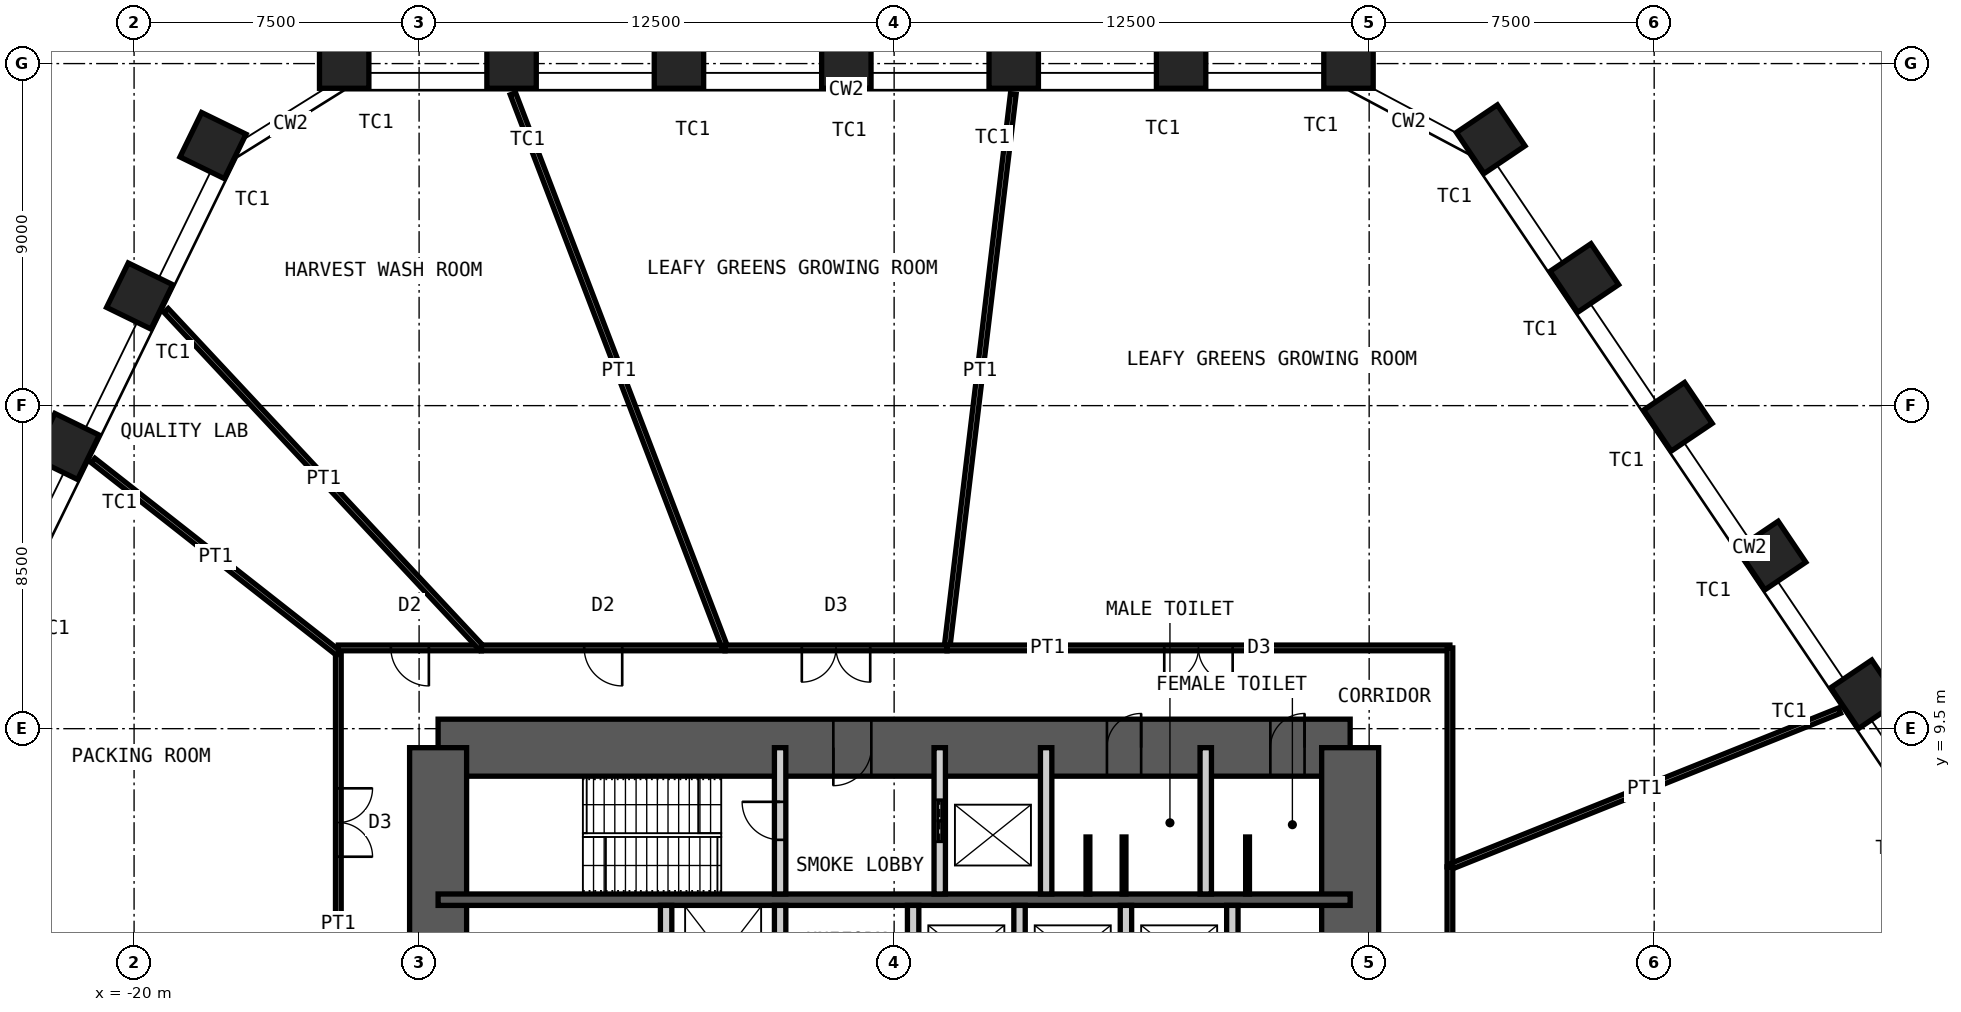
"""IFC4 building model, lengths in metres.
Left out: names, types, materials, properties, quantities, classifications, styles, units other than length and angle.
Written with IfcOpenShell. Run it as: python <this file> out.ifc"""

import sys

from ifc_helpers import new_model, si_unit, direction, frame, frame_2d, origin, origin_2d, place, context, subcontext, project, spatial, rectangle, hollow_rectangle, extrude, element, fill, save


model = new_model("IFC4")
c1 = context("Model", 3, precision=1e-05, world=origin(), true_north=direction((0.0, 1.0)))
c2 = subcontext(c1, "Body", "Model", "MODEL_VIEW")
j1 = project(units=[si_unit("LENGTHUNIT", "METRE"), si_unit("PLANEANGLEUNIT", "RADIAN")], contexts=[c1])
p1 = place(None, origin())
s1 = spatial("IfcSite", under=j1, at=p1, CompositionType="ELEMENT")
p2 = place(p1, origin())
s2 = spatial("IfcBuilding", under=s1, at=p2, CompositionType="ELEMENT")
p3 = place(p2, frame((0.0, 0.0, 42.0)))
s3 = spatial("IfcBuildingStorey", under=s2, at=p3, CompositionType="ELEMENT", Elevation=42.0)
for number, where, z_axis, x_axis in (
    (1, (-14.471, 27.0, 0.0), (0.0, 0.0, 1.0), (-1.0, 0.0, 0.0)),
    (2, (-10.067, 27.0, 0.0), (0.0, 0.0, 1.0), (-1.0, 0.0, 0.0)),
    (3, (-5.662, 27.0, 0.0), (0.0, 0.0, 1.0), (-1.0, 0.0, 0.0)),
    (4, (-1.258, 27.0, 0.0), (0.0, 0.0, 1.0), (-1.0, 0.0, 0.0)),
    (5, (3.147, 27.0, 0.0), (0.0, 0.0, 1.0), (-1.0, 0.0, 0.0)),
    (6, (7.552, 27.0, 0.0), (0.0, 0.0, 1.0), (-1.0, 0.0, 0.0)),
    (7, (11.956, 27.0, 0.0), (0.0, 0.0, 1.0), (-1.0, 0.0, 0.0)),
    (8, (15.698, 25.01, 0.0), (0.0, 0.0, 1.0), (-0.559, 0.829, 0.0)),
    (9, (18.161, 21.359, 0.0), (0.0, 0.0, 1.0), (-0.559, 0.829, 0.0)),
    (10, (20.624, 17.707, 0.0), (0.0, 0.0, 1.0), (-0.559, 0.829, 0.0)),
    (11, (23.087, 14.056, 0.0), (0.0, 0.0, 1.0), (-0.559, 0.829, 0.0)),
    (12, (25.55, 10.404, 0.0), (0.0, 0.0, 1.0), (-0.559, 0.829, 0.0)),
    (13, (-21.785, 16.925, 0.0), (0.0, 0.0, 1.0), (-0.438, -0.899, 0.0)),
    (14, (-19.854, 20.884, 0.0), (0.0, 0.0, 1.0), (-0.438, -0.899, 0.0)),
    (15, (-17.924, 24.843, 0.0), (0.0, 0.0, 1.0), (-0.438, -0.899, 0.0)),
):
    element("IfcColumn", number, at=place(p3, frame(where, z_axis=z_axis, x_axis=x_axis)), inside=s3, PredefinedType="COLUMN", context=c2, shape_type="SweptSolid", body=[
        extrude(hollow_rectangle(XDim=1.3, YDim=1.3, WallThickness=0.1, at=origin_2d()), origin(), (0.0, 0.0, 1.0), 5.0),
    ])
p4 = place(p3, frame((-12.0, 9.0, 0.0), z_axis=(0.0, 0.0, 1.0), x_axis=(1.0, 0.0, 0.0)))
e16 = element("IfcWall", 16, at=p4, inside=s3, PredefinedType="SHEAR", context=c2, shape_type="SweptSolid", body=[
    extrude(rectangle(XDim=24.0, YDim=1.5, at=frame_2d((12.0, 0.0))), origin(), (0.0, 0.0, 1.0), 5.0),
])
p5 = place(p4, frame((10.4, 0.0, 0.0)))
e17 = element("IfcOpeningElement", 17, at=p5, cuts=e16, PredefinedType="OPENING", context=c2, shape_type="SweptSolid", body=[
    extrude(rectangle(XDim=1.0, YDim=2.1, at=frame_2d((0.5, 1.05))), frame((0.0, 0.76, 0.0), z_axis=(0.0, -1.0, 0.0), x_axis=(1.0, 0.0, 0.0)), (0.0, 0.0, 1.0), 1.52),
])
p6 = place(p4, frame((17.6, 0.0, 0.0)))
e18 = element("IfcOpeningElement", 18, at=p6, cuts=e16, PredefinedType="OPENING", context=c2, shape_type="SweptSolid", body=[
    extrude(rectangle(XDim=0.9, YDim=2.1, at=frame_2d((0.45, 1.05))), frame((0.0, 0.76, 0.0), z_axis=(0.0, -1.0, 0.0), x_axis=(1.0, 0.0, 0.0)), (0.0, 0.0, 1.0), 1.52),
])
p7 = place(p4, frame((21.9, 0.0, 0.0)))
e19 = element("IfcOpeningElement", 19, at=p7, cuts=e16, PredefinedType="OPENING", context=c2, shape_type="SweptSolid", body=[
    extrude(rectangle(XDim=0.9, YDim=2.1, at=frame_2d((0.45, 1.05))), frame((0.0, 0.76, 0.0), z_axis=(0.0, -1.0, 0.0), x_axis=(1.0, 0.0, 0.0)), (0.0, 0.0, 1.0), 1.52),
])
p8 = place(p3, frame((12.0, -9.0, 0.0), z_axis=(0.0, 0.0, 1.0), x_axis=(0.0, 1.0, 0.0)))
e20 = element("IfcWall", 20, at=p8, inside=s3, PredefinedType="SHEAR", context=c2, shape_type="SweptSolid", body=[
    extrude(rectangle(XDim=18.0, YDim=1.5, at=frame_2d((9.0, 0.0))), origin(), (0.0, 0.0, 1.0), 5.0),
])
p9 = place(p8, frame((8.1, 0.0, 0.0)))
e21 = element("IfcOpeningElement", 21, at=p9, cuts=e20, PredefinedType="OPENING", context=c2, shape_type="SweptSolid", body=[
    extrude(rectangle(XDim=1.8, YDim=2.1, at=frame_2d((0.9, 1.05))), frame((0.0, 0.76, 0.0), z_axis=(0.0, -1.0, 0.0), x_axis=(1.0, 0.0, 0.0)), (0.0, 0.0, 1.0), 1.52),
])
p10 = place(p3, frame((-12.0, -9.0, 0.0), z_axis=(0.0, 0.0, 1.0), x_axis=(0.0, 1.0, 0.0)))
e22 = element("IfcWall", 22, at=p10, inside=s3, PredefinedType="SHEAR", context=c2, shape_type="SweptSolid", body=[
    extrude(rectangle(XDim=18.0, YDim=1.5, at=frame_2d((9.0, 0.0))), origin(), (0.0, 0.0, 1.0), 5.0),
])
p11 = place(p10, frame((8.1, 0.0, 0.0)))
e23 = element("IfcOpeningElement", 23, at=p11, cuts=e22, PredefinedType="OPENING", context=c2, shape_type="SweptSolid", body=[
    extrude(rectangle(XDim=1.8, YDim=2.1, at=frame_2d((0.9, 1.05))), frame((0.0, 0.76, 0.0), z_axis=(0.0, -1.0, 0.0), x_axis=(1.0, 0.0, 0.0)), (0.0, 0.0, 1.0), 1.52),
])
p12 = place(p3, frame((-12.0, 5.0, 0.0), z_axis=(0.0, 0.0, 1.0), x_axis=(1.0, 0.0, 0.0)))
e24 = element("IfcWall", 24, at=p12, inside=s3, PredefinedType="SHEAR", context=c2, shape_type="SweptSolid", body=[
    extrude(rectangle(XDim=24.0, YDim=0.3, at=frame_2d((12.0, 0.0))), origin(), (0.0, 0.0, 1.0), 5.0),
])
p13 = place(p3, frame((-3.0, 5.15, 0.0), z_axis=(0.0, 0.0, 1.0), x_axis=(0.0, 1.0, 0.0)))
e25 = element("IfcWall", 25, at=p13, inside=s3, PredefinedType="PARTITIONING", context=c2, shape_type="SweptSolid", body=[
    extrude(rectangle(XDim=3.85, YDim=0.3, at=frame_2d((1.925, 0.0))), origin(), (0.0, 0.0, 1.0), 4.78),
])
p14 = place(p13, frame((1.425, 0.0, 0.0)))
e26 = element("IfcOpeningElement", 26, at=p14, cuts=e25, PredefinedType="OPENING", context=c2, shape_type="SweptSolid", body=[
    extrude(rectangle(XDim=1.0, YDim=2.1, at=frame_2d((0.5, 1.05))), frame((0.0, 0.16, 0.0), z_axis=(0.0, -1.0, 0.0), x_axis=(1.0, 0.0, 0.0)), (0.0, 0.0, 1.0), 0.32),
])
p15 = place(p3, frame((1.2, 5.15, 0.0), z_axis=(0.0, 0.0, 1.0), x_axis=(0.0, 1.0, 0.0)))
e27 = element("IfcWall", 27, at=p15, inside=s3, PredefinedType="PARTITIONING", context=c2, shape_type="SweptSolid", body=[
    extrude(rectangle(XDim=3.85, YDim=0.3, at=frame_2d((1.925, 0.0))), origin(), (0.0, 0.0, 1.0), 4.78),
])
p16 = place(p15, frame((1.375, 0.0, 0.0)))
e28 = element("IfcOpeningElement", 28, at=p16, cuts=e27, PredefinedType="OPENING", context=c2, shape_type="SweptSolid", body=[
    extrude(rectangle(XDim=1.1, YDim=2.4, at=frame_2d((0.55, 1.2))), frame((0.0, 0.16, 0.0), z_axis=(0.0, -1.0, 0.0), x_axis=(1.0, 0.0, 0.0)), (0.0, 0.0, 1.0), 0.32),
])
for number, where, z_axis, x_axis in (
    (29, (4.0, 5.15, 0.0), (0.0, 0.0, 1.0), (0.0, 1.0, 0.0)),
    (30, (8.2, 5.15, 0.0), (0.0, 0.0, 1.0), (0.0, 1.0, 0.0)),
):
    element("IfcWall", number, at=place(p3, frame(where, z_axis=z_axis, x_axis=x_axis)), inside=s3, PredefinedType="PARTITIONING", context=c2, shape_type="SweptSolid", body=[
        extrude(rectangle(XDim=3.85, YDim=0.3, at=frame_2d((1.925, 0.0))), origin(), (0.0, 0.0, 1.0), 4.78),
    ])
for number, where, z_axis, x_axis in (
    (31, (-6.0, 2.2, 0.0), (0.0, 0.0, 1.0), (0.0, 1.0, 0.0)),
    (32, (-3.0, 2.2, 0.0), (0.0, 0.0, 1.0), (0.0, 1.0, 0.0)),
    (33, (0.5, 2.2, 0.0), (0.0, 0.0, 1.0), (0.0, 1.0, 0.0)),
    (34, (3.3, 2.2, 0.0), (0.0, 0.0, 1.0), (0.0, 1.0, 0.0)),
    (35, (6.1, 2.2, 0.0), (0.0, 0.0, 1.0), (0.0, 1.0, 0.0)),
    (36, (8.9, 2.2, 0.0), (0.0, 0.0, 1.0), (0.0, 1.0, 0.0)),
):
    element("IfcWall", number, at=place(p3, frame(where, z_axis=z_axis, x_axis=x_axis)), inside=s3, PredefinedType="PARTITIONING", context=c2, shape_type="SweptSolid", body=[
        extrude(rectangle(XDim=2.65, YDim=0.3, at=frame_2d((1.325, 0.0))), origin(), (0.0, 0.0, 1.0), 4.78),
    ])
for number, where, z_axis, x_axis in (
    (37, (5.1, 5.15, 0.0), (0.0, 0.0, 1.0), (0.0, 1.0, 0.0)),
    (38, (6.05, 5.15, 0.0), (0.0, 0.0, 1.0), (0.0, 1.0, 0.0)),
    (39, (9.3, 5.15, 0.0), (0.0, 0.0, 1.0), (0.0, 1.0, 0.0)),
):
    element("IfcWall", number, at=place(p3, frame(where, z_axis=z_axis, x_axis=x_axis)), inside=s3, PredefinedType="PARTITIONING", context=c2, shape_type="SweptSolid", body=[
        extrude(rectangle(XDim=1.5, YDim=0.1, at=frame_2d((0.75, 0.0))), origin(), (0.0, 0.0, 1.0), 2.1),
    ])
p17 = place(p3, frame((3.135, 26.201, 0.0), z_axis=(0.0, 0.0, 1.0), x_axis=(-0.118796980211, -0.992918565388, 0.0)))
e40 = element("IfcWall", 40, at=p17, inside=s3, PredefinedType="PARTITIONING", context=c2, shape_type="SweptSolid", body=[
    extrude(rectangle(XDim=14.68, YDim=0.15, at=frame_2d((7.34, 0.0))), origin(), (0.0, 0.0, 1.0), 3.7),
])
p18 = place(p3, frame((1.391, 11.625, 0.0), z_axis=(0.0, 0.0, 1.0), x_axis=(1.0, 0.0, 0.0)))
e41 = element("IfcWall", 41, at=p18, inside=s3, PredefinedType="PARTITIONING", context=c2, shape_type="SweptSolid", body=[
    extrude(rectangle(XDim=13.234, YDim=0.15, at=frame_2d((6.617, 0.0))), origin(), (0.0, 0.0, 1.0), 4.8),
])
p19 = place(p18, frame((5.717, 0.0, 0.0)))
e42 = element("IfcOpeningElement", 42, at=p19, cuts=e41, PredefinedType="OPENING", context=c2, shape_type="SweptSolid", body=[
    extrude(rectangle(XDim=1.8, YDim=2.4, at=frame_2d((0.9, 1.2))), frame((0.0, 0.085, 0.0), z_axis=(0.0, -1.0, 0.0), x_axis=(1.0, 0.0, 0.0)), (0.0, 0.0, 1.0), 0.17),
])
p20 = place(p3, frame((14.625, 11.625, 0.0), z_axis=(0.0, 0.0, 1.0), x_axis=(0.0, -1.0, 0.0)))
e43 = element("IfcWall", 43, at=p20, inside=s3, PredefinedType="PARTITIONING", context=c2, shape_type="SweptSolid", body=[
    extrude(rectangle(XDim=5.761, YDim=0.15, at=frame_2d((2.88, 0.0))), origin(), (0.0, 0.0, 1.0), 4.8),
])
p21 = place(p3, frame((24.877, 9.975, 0.0), z_axis=(0.0, 0.0, 1.0), x_axis=(-0.928157765849, -0.372186998288, 0.0)))
e44 = element("IfcWall", 44, at=p21, inside=s3, PredefinedType="PARTITIONING", context=c2, shape_type="SweptSolid", body=[
    extrude(rectangle(XDim=11.046, YDim=0.15, at=frame_2d((5.523, 0.0))), origin(), (0.0, 0.0, 1.0), 3.7),
])
p22 = place(p3, frame((14.625, 5.864, 0.0), z_axis=(0.0, 0.0, 1.0), x_axis=(0.0, -1.0, 0.0)))
e45 = element("IfcWall", 45, at=p22, inside=s3, PredefinedType="PARTITIONING", context=c2, shape_type="SweptSolid", body=[
    extrude(rectangle(XDim=8.195, YDim=0.15, at=frame_2d((4.097, 0.0))), origin(), (0.0, 0.0, 1.0), 4.8),
])
p23 = place(p22, frame((3.198, 0.0, 0.0)))
e46 = element("IfcOpeningElement", 46, at=p23, cuts=e45, PredefinedType="OPENING", context=c2, shape_type="SweptSolid", body=[
    extrude(rectangle(XDim=1.8, YDim=2.4, at=frame_2d((0.9, 1.2))), frame((0.0, 0.085, 0.0), z_axis=(0.0, -1.0, 0.0), x_axis=(1.0, 0.0, 0.0)), (0.0, 0.0, 1.0), 0.17),
])
p24 = place(p3, frame((-26.85, 4.725, 0.0), z_axis=(0.0, 0.0, 1.0), x_axis=(0.984869569104, -0.173297235559, 0.0)))
e47 = element("IfcWall", 47, at=p24, inside=s3, PredefinedType="PARTITIONING", context=c2, shape_type="SweptSolid", body=[
    extrude(rectangle(XDim=12.413, YDim=0.15, at=frame_2d((6.207, 0.0))), origin(), (0.0, 0.0, 1.0), 3.7),
])
p25 = place(p3, frame((-14.625, 2.573, 0.0), z_axis=(0.0, 0.0, 1.0), x_axis=(0.0, 1.0, 0.0)))
e48 = element("IfcWall", 48, at=p25, inside=s3, PredefinedType="PARTITIONING", context=c2, shape_type="SweptSolid", body=[
    extrude(rectangle(XDim=8.915, YDim=0.15, at=frame_2d((4.457, 0.0))), origin(), (0.0, 0.0, 1.0), 4.8),
])
p26 = place(p25, frame((3.557, 0.0, 0.0)))
e49 = element("IfcOpeningElement", 49, at=p26, cuts=e48, PredefinedType="OPENING", context=c2, shape_type="SweptSolid", body=[
    extrude(rectangle(XDim=1.8, YDim=2.4, at=frame_2d((0.9, 1.2))), frame((0.0, 0.085, 0.0), z_axis=(0.0, -1.0, 0.0), x_axis=(1.0, 0.0, 0.0)), (0.0, 0.0, 1.0), 0.17),
])
p27 = place(p3, frame((-21.077, 16.557, 0.0), z_axis=(0.0, 0.0, 1.0), x_axis=(0.786385446389, -0.617736132752, 0.0)))
e50 = element("IfcWall", 50, at=p27, inside=s3, PredefinedType="PARTITIONING", context=c2, shape_type="SweptSolid", body=[
    extrude(rectangle(XDim=8.205, YDim=0.15, at=frame_2d((4.103, 0.0))), origin(), (0.0, 0.0, 1.0), 3.7),
])
p28 = place(p3, frame((-14.625, 11.625, 0.0), z_axis=(0.0, 0.0, 1.0), x_axis=(1.0, 0.0, 0.0)))
e51 = element("IfcWall", 51, at=p28, inside=s3, PredefinedType="PARTITIONING", context=c2, shape_type="SweptSolid", body=[
    extrude(rectangle(XDim=3.764, YDim=0.15, at=frame_2d((1.882, 0.0))), origin(), (0.0, 0.0, 1.0), 4.8),
])
p29 = place(p28, frame((1.382, 0.0, 0.0)))
e52 = element("IfcOpeningElement", 52, at=p29, cuts=e51, PredefinedType="OPENING", context=c2, shape_type="SweptSolid", body=[
    extrude(rectangle(XDim=1.0, YDim=2.4, at=frame_2d((0.5, 1.2))), frame((0.0, 0.085, 0.0), z_axis=(0.0, -1.0, 0.0), x_axis=(1.0, 0.0, 0.0)), (0.0, 0.0, 1.0), 0.17),
])
p30 = place(p3, frame((-19.157, 20.504, 0.0), z_axis=(0.0, 0.0, 1.0), x_axis=(0.682689688298, -0.73070841619, 0.0)))
e53 = element("IfcWall", 53, at=p30, inside=s3, PredefinedType="PARTITIONING", context=c2, shape_type="SweptSolid", body=[
    extrude(rectangle(XDim=12.151, YDim=0.15, at=frame_2d((6.076, 0.0))), origin(), (0.0, 0.0, 1.0), 3.7),
])
p31 = place(p3, frame((-10.861, 11.625, 0.0), z_axis=(0.0, 0.0, 1.0), x_axis=(1.0, 0.0, 0.0)))
e54 = element("IfcWall", 54, at=p31, inside=s3, PredefinedType="PARTITIONING", context=c2, shape_type="SweptSolid", body=[
    extrude(rectangle(XDim=6.412, YDim=0.15, at=frame_2d((3.206, 0.0))), origin(), (0.0, 0.0, 1.0), 4.8),
])
p32 = place(p31, frame((2.706, 0.0, 0.0)))
e55 = element("IfcOpeningElement", 55, at=p32, cuts=e54, PredefinedType="OPENING", context=c2, shape_type="SweptSolid", body=[
    extrude(rectangle(XDim=1.0, YDim=2.4, at=frame_2d((0.5, 1.2))), frame((0.0, 0.085, 0.0), z_axis=(0.0, -1.0, 0.0), x_axis=(1.0, 0.0, 0.0)), (0.0, 0.0, 1.0), 0.17),
])
p33 = place(p3, frame((-10.031, 26.207, 0.0), z_axis=(0.0, 0.0, 1.0), x_axis=(0.35747288505, -0.933923517454, 0.0)))
e56 = element("IfcWall", 56, at=p33, inside=s3, PredefinedType="PARTITIONING", context=c2, shape_type="SweptSolid", body=[
    extrude(rectangle(XDim=15.613, YDim=0.15, at=frame_2d((7.807, 0.0))), origin(), (0.0, 0.0, 1.0), 3.7),
])
p34 = place(p3, frame((-4.45, 11.625, 0.0), z_axis=(0.0, 0.0, 1.0), x_axis=(1.0, 0.0, 0.0)))
e57 = element("IfcWall", 57, at=p34, inside=s3, PredefinedType="PARTITIONING", context=c2, shape_type="SweptSolid", body=[
    extrude(rectangle(XDim=5.841, YDim=0.15, at=frame_2d((2.92, 0.0))), origin(), (0.0, 0.0, 1.0), 4.8),
])
p35 = place(p34, frame((2.02, 0.0, 0.0)))
e58 = element("IfcOpeningElement", 58, at=p35, cuts=e57, PredefinedType="OPENING", context=c2, shape_type="SweptSolid", body=[
    extrude(rectangle(XDim=1.8, YDim=2.4, at=frame_2d((0.9, 1.2))), frame((0.0, 0.085, 0.0), z_axis=(0.0, -1.0, 0.0), x_axis=(1.0, 0.0, 0.0)), (0.0, 0.0, 1.0), 0.17),
])
p36 = place(p5, origin())
e59 = element("IfcDoor", 59, at=p36, inside=s3, OperationType="SINGLE_SWING_LEFT", PredefinedType="DOOR", context=c2, shape_type="SweptSolid", body=[
    extrude(rectangle(XDim=1.0, YDim=2.1, at=frame_2d((0.5, 1.05))), frame((0.0, 0.025, 0.0), z_axis=(0.0, -1.0, 0.0), x_axis=(1.0, 0.0, 0.0)), (0.0, 0.0, 1.0), 0.05),
])
fill(e17, e59)
p37 = place(p6, origin())
e60 = element("IfcDoor", 60, at=p37, inside=s3, OperationType="SINGLE_SWING_LEFT", PredefinedType="DOOR", context=c2, shape_type="SweptSolid", body=[
    extrude(rectangle(XDim=0.9, YDim=2.1, at=frame_2d((0.45, 1.05))), frame((0.0, 0.025, 0.0), z_axis=(0.0, -1.0, 0.0), x_axis=(1.0, 0.0, 0.0)), (0.0, 0.0, 1.0), 0.05),
])
fill(e18, e60)
p38 = place(p7, origin())
e61 = element("IfcDoor", 61, at=p38, inside=s3, OperationType="SINGLE_SWING_LEFT", PredefinedType="DOOR", context=c2, shape_type="SweptSolid", body=[
    extrude(rectangle(XDim=0.9, YDim=2.1, at=frame_2d((0.45, 1.05))), frame((0.0, 0.025, 0.0), z_axis=(0.0, -1.0, 0.0), x_axis=(1.0, 0.0, 0.0)), (0.0, 0.0, 1.0), 0.05),
])
fill(e19, e61)
p39 = place(p14, origin())
e62 = element("IfcDoor", 62, at=p39, inside=s3, OperationType="SINGLE_SWING_LEFT", PredefinedType="DOOR", context=c2, shape_type="SweptSolid", body=[
    extrude(rectangle(XDim=1.0, YDim=2.1, at=frame_2d((0.5, 1.05))), frame((0.0, 0.025, 0.0), z_axis=(0.0, -1.0, 0.0), x_axis=(1.0, 0.0, 0.0)), (0.0, 0.0, 1.0), 0.05),
])
fill(e26, e62)
p40 = place(p16, origin())
e63 = element("IfcDoor", 63, at=p40, inside=s3, OperationType="DOUBLE_DOOR_SLIDING", PredefinedType="DOOR", context=c2, shape_type="SweptSolid", body=[
    extrude(rectangle(XDim=1.1, YDim=2.4, at=frame_2d((0.55, 1.2))), frame((0.0, 0.025, 0.0), z_axis=(0.0, -1.0, 0.0), x_axis=(1.0, 0.0, 0.0)), (0.0, 0.0, 1.0), 0.05),
])
fill(e28, e63)
p41 = place(p19, origin())
e64 = element("IfcDoor", 64, at=p41, inside=s3, OperationType="DOUBLE_DOOR_DOUBLE_SWING", PredefinedType="DOOR", context=c2, shape_type="SweptSolid", body=[
    extrude(rectangle(XDim=1.8, YDim=2.4, at=frame_2d((0.9, 1.2))), frame((0.0, 0.025, 0.0), z_axis=(0.0, -1.0, 0.0), x_axis=(1.0, 0.0, 0.0)), (0.0, 0.0, 1.0), 0.05),
])
fill(e42, e64)
p42 = place(p26, origin())
e65 = element("IfcDoor", 65, at=p42, inside=s3, OperationType="DOUBLE_DOOR_DOUBLE_SWING", PredefinedType="DOOR", context=c2, shape_type="SweptSolid", body=[
    extrude(rectangle(XDim=1.8, YDim=2.4, at=frame_2d((0.9, 1.2))), frame((0.0, 0.025, 0.0), z_axis=(0.0, -1.0, 0.0), x_axis=(1.0, 0.0, 0.0)), (0.0, 0.0, 1.0), 0.05),
])
fill(e49, e65)
p43 = place(p29, origin())
e66 = element("IfcDoor", 66, at=p43, inside=s3, OperationType="SINGLE_SWING_RIGHT", PredefinedType="DOOR", context=c2, shape_type="SweptSolid", body=[
    extrude(rectangle(XDim=1.0, YDim=2.4, at=frame_2d((0.5, 1.2))), frame((0.0, 0.025, 0.0), z_axis=(0.0, -1.0, 0.0), x_axis=(1.0, 0.0, 0.0)), (0.0, 0.0, 1.0), 0.05),
])
fill(e52, e66)
p44 = place(p32, origin())
e67 = element("IfcDoor", 67, at=p44, inside=s3, OperationType="SINGLE_SWING_RIGHT", PredefinedType="DOOR", context=c2, shape_type="SweptSolid", body=[
    extrude(rectangle(XDim=1.0, YDim=2.4, at=frame_2d((0.5, 1.2))), frame((0.0, 0.025, 0.0), z_axis=(0.0, -1.0, 0.0), x_axis=(1.0, 0.0, 0.0)), (0.0, 0.0, 1.0), 0.05),
])
fill(e55, e67)
p45 = place(p35, origin())
e68 = element("IfcDoor", 68, at=p45, inside=s3, OperationType="DOUBLE_DOOR_DOUBLE_SWING", PredefinedType="DOOR", context=c2, shape_type="SweptSolid", body=[
    extrude(rectangle(XDim=1.8, YDim=2.4, at=frame_2d((0.9, 1.2))), frame((0.0, 0.025, 0.0), z_axis=(0.0, -1.0, 0.0), x_axis=(1.0, 0.0, 0.0)), (0.0, 0.0, 1.0), 0.05),
])
fill(e58, e68)
save(model, sys.argv[1])
